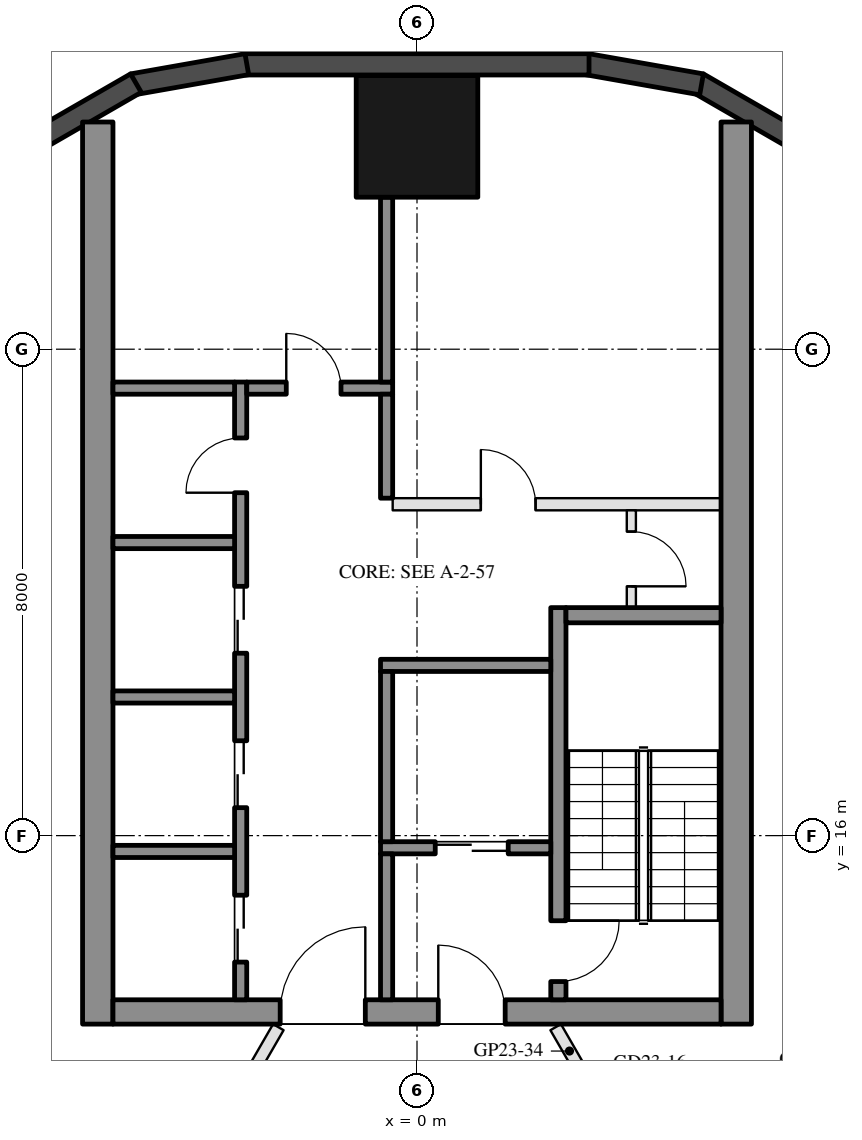
"""IFC4 building model, lengths in metres.
Left out: names, types, materials, properties, quantities, classifications, styles, units other than length and angle.
Written with IfcOpenShell. Run it as: python <this file> out.ifc"""

import sys

from ifc_helpers import new_model, si_unit, direction, frame, frame_2d, origin, origin_2d, place, context, subcontext, project, spatial, rectangle, hollow_rectangle, extrude, element, fill, save


model = new_model("IFC4")
c1 = context("Model", 3, precision=1e-05, world=origin(), true_north=direction((0.0, 1.0)))
c2 = subcontext(c1, "Body", "Model", "MODEL_VIEW")
j1 = project(units=[si_unit("LENGTHUNIT", "METRE"), si_unit("PLANEANGLEUNIT", "RADIAN")], contexts=[c1])
p1 = place(None, origin())
s1 = spatial("IfcSite", under=j1, at=p1, CompositionType="ELEMENT")
p2 = place(p1, origin())
s2 = spatial("IfcBuilding", under=s1, at=p2, CompositionType="ELEMENT")
p3 = place(p2, frame((0.0, 0.0, 246.7)))
s3 = spatial("IfcBuildingStorey", under=s2, at=p3, CompositionType="ELEMENT", Elevation=246.7)
p4 = place(p3, frame((0.0, 27.5, 0.0), z_axis=(0.0, 0.0, 1.0), x_axis=(1.0, 0.0, 0.0)))
e1 = element("IfcColumn", 1, at=p4, inside=s3, PredefinedType="COLUMN", context=c2, shape_type="SweptSolid", body=[
    extrude(hollow_rectangle(XDim=2.0, YDim=2.0, WallThickness=0.05, at=origin_2d()), origin(), (0.0, 0.0, 1.0), 3.7),
])
for number, where, z_axis, x_axis in (
    (2, (6.277, 27.422, 0.0), (0.0, 0.0, 1.0), (-0.866, 0.5, 0.0)),
    (3, (4.68, 28.356, 0.0), (0.0, 0.0, 1.0), (-0.985, 0.174, 0.0)),
):
    element("IfcWall", number, at=place(p3, frame(where, z_axis=z_axis, x_axis=x_axis)), inside=s3, PredefinedType="SOLIDWALL", context=c2, shape_type="SweptSolid", body=[
        extrude(rectangle(XDim=1.91, YDim=0.35, at=frame_2d((0.955, 0.0))), origin(), (0.0, 0.0, 1.0), 3.55),
    ])
p5 = place(p3, frame((2.829, 28.685, 0.0), z_axis=(0.0, 0.0, 1.0), x_axis=(-1.0, 0.0, 0.0)))
e4 = element("IfcWall", 4, at=p5, inside=s3, PredefinedType="SOLIDWALL", context=c2, shape_type="SweptSolid", body=[
    extrude(rectangle(XDim=5.658, YDim=0.35, at=frame_2d((2.829, 0.0))), origin(), (0.0, 0.0, 1.0), 3.55),
])
for number, where, z_axis, x_axis in (
    (5, (-2.799, 28.688, 0.0), (0.0, 0.0, 1.0), (-0.985, -0.174, 0.0)),
    (6, (-4.623, 28.377, 0.0), (0.0, 0.0, 1.0), (-0.866, -0.5, 0.0)),
):
    element("IfcWall", number, at=place(p3, frame(where, z_axis=z_axis, x_axis=x_axis)), inside=s3, PredefinedType="SOLIDWALL", context=c2, shape_type="SweptSolid", body=[
        extrude(rectangle(XDim=1.91, YDim=0.35, at=frame_2d((0.955, 0.0))), origin(), (0.0, 0.0, 1.0), 3.55),
    ])
for number, where, z_axis, x_axis in (
    (7, (5.25, 12.9, 0.0), (0.0, 0.0, 1.0), (0.0, 1.0, 0.0)),
    (8, (-5.25, 12.9, 0.0), (0.0, 0.0, 1.0), (0.0, 1.0, 0.0)),
):
    element("IfcWall", number, at=place(p3, frame(where, z_axis=z_axis, x_axis=x_axis)), inside=s3, PredefinedType="SHEAR", context=c2, shape_type="SweptSolid", body=[
        extrude(rectangle(XDim=14.837, YDim=0.5, at=frame_2d((7.418, 0.0))), origin(), (0.0, 0.0, 1.0), 3.5),
    ])
p6 = place(p3, frame((5.0, 13.1, 0.0), z_axis=(0.0, 0.0, 1.0), x_axis=(-1.0, 0.0, 0.0)))
e9 = element("IfcWall", 9, at=p6, inside=s3, PredefinedType="SHEAR", context=c2, shape_type="SweptSolid", body=[
    extrude(rectangle(XDim=10.0, YDim=0.4, at=frame_2d((5.0, 0.0))), origin(), (0.0, 0.0, 1.0), 3.5),
])
p7 = place(p6, frame((3.55, 0.0, 0.0)))
e10 = element("IfcOpeningElement", 10, at=p7, cuts=e9, PredefinedType="OPENING", context=c2, shape_type="SweptSolid", body=[
    extrude(rectangle(XDim=1.1, YDim=2.1, at=frame_2d((0.55, 1.05))), frame((0.0, 0.21, 0.0), z_axis=(0.0, -1.0, 0.0), x_axis=(1.0, 0.0, 0.0)), (0.0, 0.0, 1.0), 0.42),
])
p8 = place(p6, frame((5.85, 0.0, 0.0)))
e11 = element("IfcOpeningElement", 11, at=p8, cuts=e9, PredefinedType="OPENING", context=c2, shape_type="SweptSolid", body=[
    extrude(rectangle(XDim=1.4, YDim=2.1, at=frame_2d((0.7, 1.05))), frame((0.0, 0.21, 0.0), z_axis=(0.0, -1.0, 0.0), x_axis=(1.0, 0.0, 0.0)), (0.0, 0.0, 1.0), 0.42),
])
p9 = place(p3, frame((2.325, 13.3, 0.0), z_axis=(0.0, 0.0, 1.0), x_axis=(0.0, 1.0, 0.0)))
e12 = element("IfcWall", 12, at=p9, inside=s3, PredefinedType="SHEAR", context=c2, shape_type="SweptSolid", body=[
    extrude(rectangle(XDim=6.45, YDim=0.25, at=frame_2d((3.225, 0.0))), origin(), (0.0, 0.0, 1.0), 3.5),
])
p10 = place(p9, frame((0.3, 0.0, 0.0)))
e13 = element("IfcOpeningElement", 13, at=p10, cuts=e12, PredefinedType="OPENING", context=c2, shape_type="SweptSolid", body=[
    extrude(rectangle(XDim=1.0, YDim=2.1, at=frame_2d((0.5, 1.05))), frame((0.0, 0.135, 0.0), z_axis=(0.0, -1.0, 0.0), x_axis=(1.0, 0.0, 0.0)), (0.0, 0.0, 1.0), 0.27),
])
p11 = place(p3, frame((5.0, 19.625, 0.0), z_axis=(0.0, 0.0, 1.0), x_axis=(-1.0, 0.0, 0.0)))
e14 = element("IfcWall", 14, at=p11, inside=s3, PredefinedType="SHEAR", context=c2, shape_type="SweptSolid", body=[
    extrude(rectangle(XDim=2.55, YDim=0.25, at=frame_2d((1.275, 0.0))), origin(), (0.0, 0.0, 1.0), 3.5),
])
p12 = place(p3, frame((2.2, 18.8, 0.0), z_axis=(0.0, 0.0, 1.0), x_axis=(-1.0, 0.0, 0.0)))
e15 = element("IfcWall", 15, at=p12, inside=s3, PredefinedType="SHEAR", context=c2, shape_type="SweptSolid", body=[
    extrude(rectangle(XDim=2.8, YDim=0.2, at=frame_2d((1.4, 0.0))), origin(), (0.0, 0.0, 1.0), 3.5),
])
p13 = place(p3, frame((2.2, 15.8, 0.0), z_axis=(0.0, 0.0, 1.0), x_axis=(-1.0, 0.0, 0.0)))
e16 = element("IfcWall", 16, at=p13, inside=s3, PredefinedType="SHEAR", context=c2, shape_type="SweptSolid", body=[
    extrude(rectangle(XDim=2.8, YDim=0.2, at=frame_2d((1.4, 0.0))), origin(), (0.0, 0.0, 1.0), 3.5),
])
p14 = place(p13, frame((0.7, 0.0, 0.0)))
e17 = element("IfcOpeningElement", 17, at=p14, cuts=e16, PredefinedType="OPENING", context=c2, shape_type="SweptSolid", body=[
    extrude(rectangle(XDim=1.2, YDim=2.1, at=frame_2d((0.6, 1.05))), frame((0.0, 0.11, 0.0), z_axis=(0.0, -1.0, 0.0), x_axis=(1.0, 0.0, 0.0)), (0.0, 0.0, 1.0), 0.22),
])
p15 = place(p3, frame((-0.5, 15.9, 0.0), z_axis=(0.0, 0.0, 1.0), x_axis=(0.0, 1.0, 0.0)))
e18 = element("IfcWall", 18, at=p15, inside=s3, PredefinedType="SHEAR", context=c2, shape_type="SweptSolid", body=[
    extrude(rectangle(XDim=2.8, YDim=0.2, at=frame_2d((1.4, 0.0))), origin(), (0.0, 0.0, 1.0), 3.5),
])
p16 = place(p3, frame((-0.5, 13.3, 0.0), z_axis=(0.0, 0.0, 1.0), x_axis=(0.0, 1.0, 0.0)))
e19 = element("IfcWall", 19, at=p16, inside=s3, PredefinedType="SHEAR", context=c2, shape_type="SweptSolid", body=[
    extrude(rectangle(XDim=2.4, YDim=0.2, at=frame_2d((1.2, 0.0))), origin(), (0.0, 0.0, 1.0), 3.5),
])
p17 = place(p3, frame((-2.9, 13.3, 0.0), z_axis=(0.0, 0.0, 1.0), x_axis=(0.0, 1.0, 0.0)))
e20 = element("IfcWall", 20, at=p17, inside=s3, PredefinedType="SHEAR", context=c2, shape_type="SweptSolid", body=[
    extrude(rectangle(XDim=10.16, YDim=0.2, at=frame_2d((5.08, 0.0))), origin(), (0.0, 0.0, 1.0), 3.5),
])
p18 = place(p17, frame((0.62, 0.0, 0.0)))
e21 = element("IfcOpeningElement", 21, at=p18, cuts=e20, PredefinedType="OPENING", context=c2, shape_type="SweptSolid", body=[
    extrude(rectangle(XDim=1.1, YDim=2.1, at=frame_2d((0.55, 1.05))), frame((0.0, 0.11, 0.0), z_axis=(0.0, -1.0, 0.0), x_axis=(1.0, 0.0, 0.0)), (0.0, 0.0, 1.0), 0.22),
])
p19 = place(p17, frame((3.16, 0.0, 0.0)))
e22 = element("IfcOpeningElement", 22, at=p19, cuts=e20, PredefinedType="OPENING", context=c2, shape_type="SweptSolid", body=[
    extrude(rectangle(XDim=1.1, YDim=2.1, at=frame_2d((0.55, 1.05))), frame((0.0, 0.11, 0.0), z_axis=(0.0, -1.0, 0.0), x_axis=(1.0, 0.0, 0.0)), (0.0, 0.0, 1.0), 0.22),
])
p20 = place(p17, frame((5.7, 0.0, 0.0)))
e23 = element("IfcOpeningElement", 23, at=p20, cuts=e20, PredefinedType="OPENING", context=c2, shape_type="SweptSolid", body=[
    extrude(rectangle(XDim=1.1, YDim=2.1, at=frame_2d((0.55, 1.05))), frame((0.0, 0.11, 0.0), z_axis=(0.0, -1.0, 0.0), x_axis=(1.0, 0.0, 0.0)), (0.0, 0.0, 1.0), 0.22),
])
p21 = place(p17, frame((8.34, 0.0, 0.0)))
e24 = element("IfcOpeningElement", 24, at=p21, cuts=e20, PredefinedType="OPENING", context=c2, shape_type="SweptSolid", body=[
    extrude(rectangle(XDim=0.9, YDim=2.1, at=frame_2d((0.45, 1.05))), frame((0.0, 0.11, 0.0), z_axis=(0.0, -1.0, 0.0), x_axis=(1.0, 0.0, 0.0)), (0.0, 0.0, 1.0), 0.22),
])
p22 = place(p3, frame((-0.4, 23.36, 0.0), z_axis=(0.0, 0.0, 1.0), x_axis=(-1.0, 0.0, 0.0)))
e25 = element("IfcWall", 25, at=p22, inside=s3, PredefinedType="SHEAR", context=c2, shape_type="SweptSolid", body=[
    extrude(rectangle(XDim=2.4, YDim=0.2, at=frame_2d((1.2, 0.0))), origin(), (0.0, 0.0, 1.0), 3.5),
])
p23 = place(p22, frame((0.85, 0.0, 0.0)))
e26 = element("IfcOpeningElement", 26, at=p23, cuts=e25, PredefinedType="OPENING", context=c2, shape_type="SweptSolid", body=[
    extrude(rectangle(XDim=0.9, YDim=2.1, at=frame_2d((0.45, 1.05))), frame((0.0, 0.11, 0.0), z_axis=(0.0, -1.0, 0.0), x_axis=(1.0, 0.0, 0.0)), (0.0, 0.0, 1.0), 0.22),
])
p24 = place(p3, frame((-0.5, 21.55, 0.0), z_axis=(0.0, 0.0, 1.0), x_axis=(0.0, 1.0, 0.0)))
e27 = element("IfcWall", 27, at=p24, inside=s3, PredefinedType="SHEAR", context=c2, shape_type="SweptSolid", body=[
    extrude(rectangle(XDim=1.71, YDim=0.2, at=frame_2d((0.855, 0.0))), origin(), (0.0, 0.0, 1.0), 3.5),
])
for number, where, z_axis, x_axis in (
    (28, (-3.0, 15.74, 0.0), (0.0, 0.0, 1.0), (-1.0, 0.0, 0.0)),
    (29, (-3.0, 18.28, 0.0), (0.0, 0.0, 1.0), (-1.0, 0.0, 0.0)),
    (30, (-3.0, 20.82, 0.0), (0.0, 0.0, 1.0), (-1.0, 0.0, 0.0)),
    (31, (-3.0, 23.36, 0.0), (0.0, 0.0, 1.0), (-1.0, 0.0, 0.0)),
):
    element("IfcWall", number, at=place(p3, frame(where, z_axis=z_axis, x_axis=x_axis)), inside=s3, PredefinedType="SHEAR", context=c2, shape_type="SweptSolid", body=[
        extrude(rectangle(XDim=2.0, YDim=0.2, at=frame_2d((1.0, 0.0))), origin(), (0.0, 0.0, 1.0), 3.5),
    ])
p25 = place(p3, frame((-0.5, 23.46, 0.0), z_axis=(0.0, 0.0, 1.0), x_axis=(0.0, 1.0, 0.0)))
e32 = element("IfcWall", 32, at=p25, inside=s3, PredefinedType="SHEAR", context=c2, shape_type="SweptSolid", body=[
    extrude(rectangle(XDim=3.04, YDim=0.2, at=frame_2d((1.52, 0.0))), origin(), (0.0, 0.0, 1.0), 3.5),
])
p26 = place(p3, frame((5.0, 21.45, 0.0), z_axis=(0.0, 0.0, 1.0), x_axis=(-1.0, 0.0, 0.0)))
e33 = element("IfcWall", 33, at=p26, inside=s3, PredefinedType="PARTITIONING", context=c2, shape_type="SweptSolid", body=[
    extrude(rectangle(XDim=5.4, YDim=0.2, at=frame_2d((2.7, 0.0))), origin(), (0.0, 0.0, 1.0), 3.5),
])
p27 = place(p26, frame((3.05, 0.0, 0.0)))
e34 = element("IfcOpeningElement", 34, at=p27, cuts=e33, PredefinedType="OPENING", context=c2, shape_type="SweptSolid", body=[
    extrude(rectangle(XDim=0.9, YDim=2.1, at=frame_2d((0.45, 1.05))), frame((0.0, 0.11, 0.0), z_axis=(0.0, -1.0, 0.0), x_axis=(1.0, 0.0, 0.0)), (0.0, 0.0, 1.0), 0.22),
])
p28 = place(p3, frame((3.525, 19.75, 0.0), z_axis=(0.0, 0.0, 1.0), x_axis=(0.0, 1.0, 0.0)))
e35 = element("IfcWall", 35, at=p28, inside=s3, PredefinedType="PARTITIONING", context=c2, shape_type="SweptSolid", body=[
    extrude(rectangle(XDim=1.6, YDim=0.15, at=frame_2d((0.8, 0.0))), origin(), (0.0, 0.0, 1.0), 3.5),
])
p29 = place(p28, frame((0.35, 0.0, 0.0)))
e36 = element("IfcOpeningElement", 36, at=p29, cuts=e35, PredefinedType="OPENING", context=c2, shape_type="SweptSolid", body=[
    extrude(rectangle(XDim=0.9, YDim=2.1, at=frame_2d((0.45, 1.05))), frame((0.0, 0.085, 0.0), z_axis=(0.0, -1.0, 0.0), x_axis=(1.0, 0.0, 0.0)), (0.0, 0.0, 1.0), 0.17),
])
p30 = place(p3, frame((13.952, 14.395, 0.0), z_axis=(0.0, 0.0, 1.0), x_axis=(-0.892890171934, -0.450274517226, 0.0)))
e37 = element("IfcWall", 37, at=p30, inside=s3, PredefinedType="PARTITIONING", context=c2, shape_type="SweptSolid", body=[
    extrude(rectangle(XDim=10.998, YDim=0.2, at=frame_2d((5.499, 0.0))), origin(), (0.0, 0.0, 1.0), 3.16),
])
p31 = place(p3, frame((2.281, 12.85, 0.0), z_axis=(0.0, 0.0, 1.0), x_axis=(0.499985062256, -0.866034027923, 0.0)))
e38 = element("IfcWall", 38, at=p31, inside=s3, PredefinedType="PARTITIONING", context=c2, shape_type="SweptSolid", body=[
    extrude(rectangle(XDim=3.782, YDim=0.2, at=frame_2d((1.891, 0.0))), origin(), (0.0, 0.0, 1.0), 2.95),
])
p32 = place(p31, frame((1.391, 0.0, 0.0)))
e39 = element("IfcOpeningElement", 39, at=p32, cuts=e38, PredefinedType="OPENING", context=c2, shape_type="SweptSolid", body=[
    extrude(rectangle(XDim=1.0, YDim=2.1, at=frame_2d((0.5, 1.05))), frame((0.0, 0.11, 0.0), z_axis=(0.0, -1.0, 0.0), x_axis=(1.0, 0.0, 0.0)), (0.0, 0.0, 1.0), 0.22),
])
p33 = place(p3, frame((-5.221, 7.757, 0.0), z_axis=(0.0, 0.0, 1.0), x_axis=(0.49998360248, 0.86603487069, 0.0)))
e40 = element("IfcWall", 40, at=p33, inside=s3, PredefinedType="PARTITIONING", context=c2, shape_type="SweptSolid", body=[
    extrude(rectangle(XDim=5.881, YDim=0.2, at=frame_2d((2.94, 0.0))), origin(), (0.0, 0.0, 1.0), 2.95),
])
p34 = place(p33, frame((2.44, 0.0, 0.0)))
e41 = element("IfcOpeningElement", 41, at=p34, cuts=e40, PredefinedType="OPENING", context=c2, shape_type="SweptSolid", body=[
    extrude(rectangle(XDim=1.0, YDim=2.1, at=frame_2d((0.5, 1.05))), frame((0.0, 0.11, 0.0), z_axis=(0.0, -1.0, 0.0), x_axis=(1.0, 0.0, 0.0)), (0.0, 0.0, 1.0), 0.22),
])
p35 = place(p14, origin())
e42 = element("IfcDoor", 42, at=p35, inside=s3, OperationType="DOUBLE_DOOR_SLIDING", PredefinedType="DOOR", context=c2, shape_type="SweptSolid", body=[
    extrude(rectangle(XDim=1.2, YDim=2.1, at=frame_2d((0.6, 1.05))), frame((0.0, 0.025, 0.0), z_axis=(0.0, -1.0, 0.0), x_axis=(1.0, 0.0, 0.0)), (0.0, 0.0, 1.0), 0.05),
])
fill(e17, e42)
p36 = place(p29, frame((0.9, 0.0, 0.0), z_axis=(0.0, 0.0, 1.0), x_axis=(-1.0, 0.0, 0.0)))
e43 = element("IfcDoor", 43, at=p36, inside=s3, OperationType="SINGLE_SWING_RIGHT", PredefinedType="DOOR", context=c2, shape_type="SweptSolid", body=[
    extrude(rectangle(XDim=0.9, YDim=2.1, at=frame_2d((0.45, 1.05))), frame((0.0, 0.025, 0.0), z_axis=(0.0, -1.0, 0.0), x_axis=(1.0, 0.0, 0.0)), (0.0, 0.0, 1.0), 0.05),
])
fill(e36, e43)
p37 = place(p18, origin())
e44 = element("IfcDoor", 44, at=p37, inside=s3, OperationType="DOUBLE_DOOR_SLIDING", PredefinedType="DOOR", context=c2, shape_type="SweptSolid", body=[
    extrude(rectangle(XDim=1.1, YDim=2.1, at=frame_2d((0.55, 1.05))), frame((0.0, 0.025, 0.0), z_axis=(0.0, -1.0, 0.0), x_axis=(1.0, 0.0, 0.0)), (0.0, 0.0, 1.0), 0.05),
])
fill(e21, e44)
p38 = place(p19, origin())
e45 = element("IfcDoor", 45, at=p38, inside=s3, OperationType="DOUBLE_DOOR_SLIDING", PredefinedType="DOOR", context=c2, shape_type="SweptSolid", body=[
    extrude(rectangle(XDim=1.1, YDim=2.1, at=frame_2d((0.55, 1.05))), frame((0.0, 0.025, 0.0), z_axis=(0.0, -1.0, 0.0), x_axis=(1.0, 0.0, 0.0)), (0.0, 0.0, 1.0), 0.05),
])
fill(e22, e45)
p39 = place(p20, origin())
e46 = element("IfcDoor", 46, at=p39, inside=s3, OperationType="DOUBLE_DOOR_SLIDING", PredefinedType="DOOR", context=c2, shape_type="SweptSolid", body=[
    extrude(rectangle(XDim=1.1, YDim=2.1, at=frame_2d((0.55, 1.05))), frame((0.0, 0.025, 0.0), z_axis=(0.0, -1.0, 0.0), x_axis=(1.0, 0.0, 0.0)), (0.0, 0.0, 1.0), 0.05),
])
fill(e23, e46)
p40 = place(p21, origin())
e47 = element("IfcDoor", 47, at=p40, inside=s3, OperationType="SINGLE_SWING_LEFT", PredefinedType="DOOR", context=c2, shape_type="SweptSolid", body=[
    extrude(rectangle(XDim=0.9, YDim=2.1, at=frame_2d((0.45, 1.05))), frame((0.0, 0.025, 0.0), z_axis=(0.0, -1.0, 0.0), x_axis=(1.0, 0.0, 0.0)), (0.0, 0.0, 1.0), 0.05),
])
fill(e24, e47)
p41 = place(p23, frame((0.9, 0.0, 0.0), z_axis=(0.0, 0.0, 1.0), x_axis=(-1.0, 0.0, 0.0)))
e48 = element("IfcDoor", 48, at=p41, inside=s3, OperationType="SINGLE_SWING_LEFT", PredefinedType="DOOR", context=c2, shape_type="SweptSolid", body=[
    extrude(rectangle(XDim=0.9, YDim=2.1, at=frame_2d((0.45, 1.05))), frame((0.0, 0.025, 0.0), z_axis=(0.0, -1.0, 0.0), x_axis=(1.0, 0.0, 0.0)), (0.0, 0.0, 1.0), 0.05),
])
fill(e26, e48)
p42 = place(p27, frame((0.9, 0.0, 0.0), z_axis=(0.0, 0.0, 1.0), x_axis=(-1.0, 0.0, 0.0)))
e49 = element("IfcDoor", 49, at=p42, inside=s3, OperationType="SINGLE_SWING_LEFT", PredefinedType="DOOR", context=c2, shape_type="SweptSolid", body=[
    extrude(rectangle(XDim=0.9, YDim=2.1, at=frame_2d((0.45, 1.05))), frame((0.0, 0.025, 0.0), z_axis=(0.0, -1.0, 0.0), x_axis=(1.0, 0.0, 0.0)), (0.0, 0.0, 1.0), 0.05),
])
fill(e34, e49)
p43 = place(p7, frame((1.1, 0.0, 0.0), z_axis=(0.0, 0.0, 1.0), x_axis=(-1.0, 0.0, 0.0)))
e50 = element("IfcDoor", 50, at=p43, inside=s3, OperationType="SINGLE_SWING_LEFT", PredefinedType="DOOR", context=c2, shape_type="SweptSolid", body=[
    extrude(rectangle(XDim=1.1, YDim=2.1, at=frame_2d((0.55, 1.05))), frame((0.0, 0.025, 0.0), z_axis=(0.0, -1.0, 0.0), x_axis=(1.0, 0.0, 0.0)), (0.0, 0.0, 1.0), 0.05),
])
fill(e10, e50)
p44 = place(p8, frame((1.4, 0.0, 0.0), z_axis=(0.0, 0.0, 1.0), x_axis=(-1.0, 0.0, 0.0)))
e51 = element("IfcDoor", 51, at=p44, inside=s3, OperationType="DOUBLE_DOOR_SINGLE_SWING", PredefinedType="DOOR", context=c2, shape_type="SweptSolid", body=[
    extrude(rectangle(XDim=1.4, YDim=2.1, at=frame_2d((0.7, 1.05))), frame((0.0, 0.025, 0.0), z_axis=(0.0, -1.0, 0.0), x_axis=(1.0, 0.0, 0.0)), (0.0, 0.0, 1.0), 0.05),
])
fill(e11, e51)
p45 = place(p10, frame((1.0, 0.0, 0.0), z_axis=(0.0, 0.0, 1.0), x_axis=(-1.0, 0.0, 0.0)))
e52 = element("IfcDoor", 52, at=p45, inside=s3, OperationType="SINGLE_SWING_LEFT", PredefinedType="DOOR", context=c2, shape_type="SweptSolid", body=[
    extrude(rectangle(XDim=1.0, YDim=2.1, at=frame_2d((0.5, 1.05))), frame((0.0, 0.025, 0.0), z_axis=(0.0, -1.0, 0.0), x_axis=(1.0, 0.0, 0.0)), (0.0, 0.0, 1.0), 0.05),
])
fill(e13, e52)
save(model, sys.argv[1])
